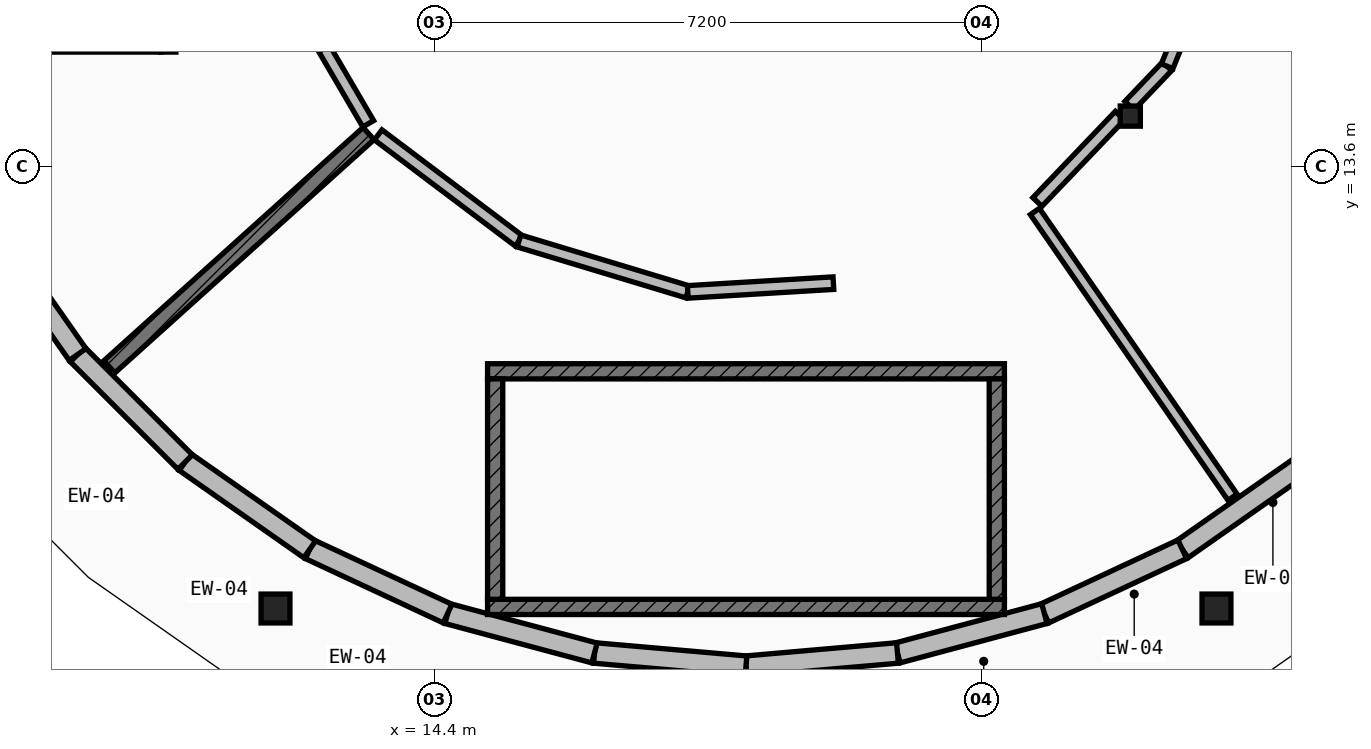
"""IFC4 building model, lengths in metres.
Left out: names, types, materials, properties, quantities, classifications, styles, units other than length and angle.
Written with IfcOpenShell. Run it as: python <this file> out.ifc"""

import sys

from ifc_helpers import new_model, si_unit, direction, frame, frame_2d, origin, origin_2d, place, context, subcontext, project, spatial, rectangle, circle, extrude, element, fill, save


model = new_model("IFC4")
c1 = context("Model", 3, precision=1e-05, world=origin(), true_north=direction((0.0, 1.0)))
c2 = subcontext(c1, "Body", "Model", "MODEL_VIEW")
j1 = project(units=[si_unit("LENGTHUNIT", "METRE"), si_unit("PLANEANGLEUNIT", "RADIAN")], contexts=[c1])
p1 = place(None, origin())
s1 = spatial("IfcSite", under=j1, at=p1, CompositionType="ELEMENT")
p2 = place(p1, origin())
s2 = spatial("IfcBuilding", under=s1, at=p2, CompositionType="ELEMENT")
p3 = place(p2, frame((0.0, 0.0, 17.15)))
s3 = spatial("IfcBuildingStorey", under=s2, at=p3, CompositionType="ELEMENT", Elevation=17.15)
for number, where, z_axis, x_axis in (
    (1, (12.31, 7.779, 0.0), (0.0, 0.0, 1.0), (1.0, 0.0, 0.0)),
    (2, (24.69, 7.779, 0.0), (0.0, 0.0, 1.0), (1.0, 0.0, 0.0)),
):
    element("IfcColumn", number, at=place(p3, frame(where, z_axis=z_axis, x_axis=x_axis)), inside=s3, PredefinedType="PILASTER", context=c2, shape_type="SweptSolid", body=[
        extrude(circle(Radius=0.19, at=origin_2d()), origin(), (0.0, 0.0, 1.0), 4.2),
    ])
p4 = place(p3, frame((23.556, 14.258, 0.0), z_axis=(0.0, 0.0, 1.0), x_axis=(1.0, 0.0, 0.0)))
e3 = element("IfcColumn", 3, at=p4, inside=s3, PredefinedType="COLUMN", context=c2, shape_type="SweptSolid", body=[
    extrude(rectangle(XDim=0.265, YDim=0.265, at=origin_2d()), origin(), (0.0, 0.0, 1.0), 4.2),
])
p5 = place(p3, frame((25.879, 9.706, 0.0), z_axis=(0.0, 0.0, 1.0), x_axis=(-0.819065655169, -0.573699793029, 0.0)))
e4 = element("IfcWall", 4, at=p5, inside=s3, PredefinedType="ELEMENTEDWALL", context=c2, shape_type="SweptSolid", body=[
    extrude(rectangle(XDim=2.001, YDim=0.27, at=frame_2d((1.0, 0.0))), origin(), (0.0, 0.0, 1.0), 3.314),
])
p6 = place(p5, frame((0.411, 0.0, 0.85)))
e5 = element("IfcOpeningElement", 5, at=p6, cuts=e4, PredefinedType="OPENING", context=c2, shape_type="SweptSolid", body=[
    extrude(rectangle(XDim=1.18, YDim=1.55, at=frame_2d((0.59, 0.775))), frame((0.0, 0.145, 0.0), z_axis=(0.0, -1.0, 0.0), x_axis=(1.0, 0.0, 0.0)), (0.0, 0.0, 1.0), 0.29),
])
p7 = place(p3, frame((24.24, 8.558, 0.0), z_axis=(0.0, 0.0, 1.0), x_axis=(-0.906245451167, -0.422751915713, 0.0)))
e6 = element("IfcWall", 6, at=p7, inside=s3, PredefinedType="ELEMENTEDWALL", context=c2, shape_type="SweptSolid", body=[
    extrude(rectangle(XDim=2.002, YDim=0.27, at=frame_2d((1.001, 0.0))), origin(), (0.0, 0.0, 1.0), 3.314),
])
p8 = place(p7, frame((0.411, 0.0, 0.85)))
e7 = element("IfcOpeningElement", 7, at=p8, cuts=e6, PredefinedType="OPENING", context=c2, shape_type="SweptSolid", body=[
    extrude(rectangle(XDim=1.18, YDim=1.85, at=frame_2d((0.59, 0.925))), frame((0.0, 0.145, 0.0), z_axis=(0.0, -1.0, 0.0), x_axis=(1.0, 0.0, 0.0)), (0.0, 0.0, 1.0), 0.29),
])
p9 = place(p3, frame((22.426, 7.712, 0.0), z_axis=(0.0, 0.0, 1.0), x_axis=(-0.965944784715, -0.258748280927, 0.0)))
e8 = element("IfcWall", 8, at=p9, inside=s3, PredefinedType="ELEMENTEDWALL", context=c2, shape_type="SweptSolid", body=[
    extrude(rectangle(XDim=2.001, YDim=0.27, at=frame_2d((1.0, 0.0))), origin(), (0.0, 0.0, 1.0), 3.314),
])
p10 = place(p9, frame((0.401, 0.0, 0.85)))
e9 = element("IfcOpeningElement", 9, at=p10, cuts=e8, PredefinedType="OPENING", context=c2, shape_type="SweptSolid", body=[
    extrude(rectangle(XDim=1.2, YDim=1.35, at=frame_2d((0.6, 0.675))), frame((0.0, 0.145, 0.0), z_axis=(0.0, -1.0, 0.0), x_axis=(1.0, 0.0, 0.0)), (0.0, 0.0, 1.0), 0.29),
])
for number, where, z_axis, x_axis in (
    (10, (20.493, 7.194, 0.0), (0.0, 0.0, 1.0), (-0.996, -0.087, 0.0)),
    (11, (18.5, 7.02, 0.0), (0.0, 0.0, 1.0), (-0.996, 0.087, 0.0)),
):
    element("IfcWall", number, at=place(p3, frame(where, z_axis=z_axis, x_axis=x_axis)), inside=s3, PredefinedType="ELEMENTEDWALL", context=c2, shape_type="SweptSolid", body=[
        extrude(rectangle(XDim=2.0, YDim=0.27, at=frame_2d((1.0, 0.0))), origin(), (0.0, 0.0, 1.0), 3.314),
    ])
p11 = place(p3, frame((16.507, 7.194, 0.0), z_axis=(0.0, 0.0, 1.0), x_axis=(-0.965944784715, 0.258748280927, 0.0)))
e12 = element("IfcWall", 12, at=p11, inside=s3, PredefinedType="ELEMENTEDWALL", context=c2, shape_type="SweptSolid", body=[
    extrude(rectangle(XDim=2.001, YDim=0.27, at=frame_2d((1.0, 0.0))), origin(), (0.0, 0.0, 1.0), 3.314),
])
p12 = place(p11, frame((0.401, 0.0, 0.85)))
e13 = element("IfcOpeningElement", 13, at=p12, cuts=e12, PredefinedType="OPENING", context=c2, shape_type="SweptSolid", body=[
    extrude(rectangle(XDim=1.2, YDim=1.65, at=frame_2d((0.6, 0.825))), frame((0.0, 0.145, 0.0), z_axis=(0.0, -1.0, 0.0), x_axis=(1.0, 0.0, 0.0)), (0.0, 0.0, 1.0), 0.29),
])
p13 = place(p3, frame((14.574, 7.712, 0.0), z_axis=(0.0, 0.0, 1.0), x_axis=(-0.906245451167, 0.422751915713, 0.0)))
e14 = element("IfcWall", 14, at=p13, inside=s3, PredefinedType="ELEMENTEDWALL", context=c2, shape_type="SweptSolid", body=[
    extrude(rectangle(XDim=2.002, YDim=0.27, at=frame_2d((1.001, 0.0))), origin(), (0.0, 0.0, 1.0), 3.314),
])
p14 = place(p13, frame((0.401, 0.0, 0.85)))
e15 = element("IfcOpeningElement", 15, at=p14, cuts=e14, PredefinedType="OPENING", context=c2, shape_type="SweptSolid", body=[
    extrude(rectangle(XDim=1.2, YDim=1.95, at=frame_2d((0.6, 0.975))), frame((0.0, 0.145, 0.0), z_axis=(0.0, -1.0, 0.0), x_axis=(1.0, 0.0, 0.0)), (0.0, 0.0, 1.0), 0.29),
])
p15 = place(p3, frame((12.76, 8.558, 0.0), z_axis=(0.0, 0.0, 1.0), x_axis=(-0.819065655169, 0.573699793029, 0.0)))
e16 = element("IfcWall", 16, at=p15, inside=s3, PredefinedType="ELEMENTEDWALL", context=c2, shape_type="SweptSolid", body=[
    extrude(rectangle(XDim=2.001, YDim=0.27, at=frame_2d((1.0, 0.0))), origin(), (0.0, 0.0, 1.0), 3.314),
])
p16 = place(p15, frame((0.401, 0.0, 0.85)))
e17 = element("IfcOpeningElement", 17, at=p16, cuts=e16, PredefinedType="OPENING", context=c2, shape_type="SweptSolid", body=[
    extrude(rectangle(XDim=1.2, YDim=2.25, at=frame_2d((0.6, 1.125))), frame((0.0, 0.145, 0.0), z_axis=(0.0, -1.0, 0.0), x_axis=(1.0, 0.0, 0.0)), (0.0, 0.0, 1.0), 0.29),
])
p17 = place(p3, frame((11.121, 9.706, 0.0), z_axis=(0.0, 0.0, 1.0), x_axis=(-0.707106781187, 0.707106781187, 0.0)))
e18 = element("IfcWall", 18, at=p17, inside=s3, PredefinedType="ELEMENTEDWALL", context=c2, shape_type="SweptSolid", body=[
    extrude(rectangle(XDim=2.001, YDim=0.27, at=frame_2d((1.0, 0.0))), origin(), (0.0, 0.0, 1.0), 3.314),
])
p18 = place(p17, frame((0.391, 0.0, 0.85)))
e19 = element("IfcOpeningElement", 19, at=p18, cuts=e18, PredefinedType="OPENING", context=c2, shape_type="SweptSolid", body=[
    extrude(rectangle(XDim=1.22, YDim=1.5, at=frame_2d((0.61, 0.75))), frame((0.0, 0.145, 0.0), z_axis=(0.0, -1.0, 0.0), x_axis=(1.0, 0.0, 0.0)), (0.0, 0.0, 1.0), 0.29),
])
p19 = place(p3, frame((9.706, 11.121, 0.0), z_axis=(0.0, 0.0, 1.0), x_axis=(-0.573699793029, 0.819065655169, 0.0)))
e20 = element("IfcWall", 20, at=p19, inside=s3, PredefinedType="ELEMENTEDWALL", context=c2, shape_type="SweptSolid", body=[
    extrude(rectangle(XDim=2.001, YDim=0.27, at=frame_2d((1.0, 0.0))), origin(), (0.0, 0.0, 1.0), 3.314),
])
p20 = place(p19, frame((0.391, 0.0, 0.85)))
e21 = element("IfcOpeningElement", 21, at=p20, cuts=e20, PredefinedType="OPENING", context=c2, shape_type="SweptSolid", body=[
    extrude(rectangle(XDim=1.22, YDim=1.8, at=frame_2d((0.61, 0.9))), frame((0.0, 0.145, 0.0), z_axis=(0.0, -1.0, 0.0), x_axis=(1.0, 0.0, 0.0)), (0.0, 0.0, 1.0), 0.29),
])
p21 = place(p3, frame((21.9, 10.9, 0.0), z_axis=(0.0, 0.0, 1.0), x_axis=(-1.0, 0.0, 0.0)))
e22 = element("IfcWall", 22, at=p21, inside=s3, PredefinedType="SHEAR", context=c2, shape_type="SweptSolid", body=[
    extrude(rectangle(XDim=6.8, YDim=0.2, at=frame_2d((3.4, 0.0))), origin(), (0.0, 0.0, 1.0), 3.96),
])
p22 = place(p21, frame((0.38, 0.0, 0.0)))
e23 = element("IfcOpeningElement", 23, at=p22, cuts=e22, PredefinedType="OPENING", context=c2, shape_type="SweptSolid", body=[
    extrude(rectangle(XDim=1.1, YDim=2.15, at=frame_2d((0.55, 1.075))), frame((0.0, 0.11, 0.0), z_axis=(0.0, -1.0, 0.0), x_axis=(1.0, 0.0, 0.0)), (0.0, 0.0, 1.0), 0.22),
])
p23 = place(p3, frame((21.9, 7.8, 0.0), z_axis=(0.0, 0.0, 1.0), x_axis=(-1.0, 0.0, 0.0)))
e24 = element("IfcWall", 24, at=p23, inside=s3, PredefinedType="SHEAR", context=c2, shape_type="SweptSolid", body=[
    extrude(rectangle(XDim=6.8, YDim=0.2, at=frame_2d((3.4, 0.0))), origin(), (0.0, 0.0, 1.0), 3.96),
])
for number, where, z_axis, x_axis in (
    (25, (21.8, 10.8, 0.0), (0.0, 0.0, 1.0), (0.0, -1.0, 0.0)),
    (26, (15.2, 10.8, 0.0), (0.0, 0.0, 1.0), (0.0, -1.0, 0.0)),
):
    element("IfcWall", number, at=place(p3, frame(where, z_axis=z_axis, x_axis=x_axis)), inside=s3, PredefinedType="SHEAR", context=c2, shape_type="SweptSolid", body=[
        extrude(rectangle(XDim=2.9, YDim=0.2, at=frame_2d((1.45, 0.0))), origin(), (0.0, 0.0, 1.0), 3.96),
    ])
p24 = place(p3, frame((13.534, 14.028, 0.0), z_axis=(0.0, 0.0, 1.0), x_axis=(-0.743275623073, -0.668985312354, 0.0)))
e27 = element("IfcWall", 27, at=p24, inside=s3, PredefinedType="SOLIDWALL", context=c2, shape_type="SweptSolid", body=[
    extrude(rectangle(XDim=4.588, YDim=0.215, at=frame_2d((2.294, 0.0))), origin(), (0.0, 0.0, 1.0), 3.279),
])
p25 = place(p3, frame((22.301, 13.003, 0.0), z_axis=(0.0, 0.0, 1.0), x_axis=(0.56891282969, -0.822397830867, 0.0)))
e28 = element("IfcWall", 28, at=p25, inside=s3, PredefinedType="PARTITIONING", context=c2, shape_type="SweptSolid", body=[
    extrude(rectangle(XDim=4.572, YDim=0.145, at=frame_2d((2.286, 0.0))), origin(), (0.0, 0.0, 1.0), 3.279),
])
p26 = place(p3, frame((12.95, 15.148, 0.0), z_axis=(0.0, 0.0, 1.0), x_axis=(0.505179201569, -0.863014469347, 0.0)))
e29 = element("IfcWall", 29, at=p26, inside=s3, PredefinedType="PARTITIONING", context=c2, shape_type="SweptSolid", body=[
    extrude(rectangle(XDim=1.148, YDim=0.165, at=frame_2d((0.574, 0.0))), origin(), (0.0, 0.0, 1.0), 3.279),
])
p27 = place(p3, frame((13.661, 14.011, 0.0), z_axis=(0.0, 0.0, 1.0), x_axis=(0.798557639329, -0.601918347177, 0.0)))
e30 = element("IfcWall", 30, at=p27, inside=s3, PredefinedType="PARTITIONING", context=c2, shape_type="SweptSolid", body=[
    extrude(rectangle(XDim=2.319, YDim=0.165, at=frame_2d((1.16, 0.0))), origin(), (0.0, 0.0, 1.0), 3.279),
])
p28 = place(p27, frame((0.485, 0.0, 0.0)))
e31 = element("IfcOpeningElement", 31, at=p28, cuts=e30, PredefinedType="OPENING", context=c2, shape_type="SweptSolid", body=[
    extrude(rectangle(XDim=1.35, YDim=2.22, at=frame_2d((0.675, 1.11))), frame((0.0, 0.093, 0.0), z_axis=(0.0, -1.0, 0.0), x_axis=(1.0, 0.0, 0.0)), (0.0, 0.0, 1.0), 0.185),
])
p29 = place(p3, frame((15.513, 12.615, 0.0), z_axis=(0.0, 0.0, 1.0), x_axis=(0.957393612843, -0.288786201346, 0.0)))
e32 = element("IfcWall", 32, at=p29, inside=s3, PredefinedType="PARTITIONING", context=c2, shape_type="SweptSolid", body=[
    extrude(rectangle(XDim=2.32, YDim=0.165, at=frame_2d((1.16, 0.0))), origin(), (0.0, 0.0, 1.0), 3.279),
])
p30 = place(p3, frame((17.734, 11.945, 0.0), z_axis=(0.0, 0.0, 1.0), x_axis=(0.998203932851, 0.059907499028, 0.0)))
e33 = element("IfcWall", 33, at=p30, inside=s3, PredefinedType="PARTITIONING", context=c2, shape_type="SweptSolid", body=[
    extrude(rectangle(XDim=1.919, YDim=0.165, at=frame_2d((0.96, 0.0))), origin(), (0.0, 0.0, 1.0), 3.279),
])
p31 = place(p3, frame((22.334, 13.128, 0.0), z_axis=(0.0, 0.0, 1.0), x_axis=(0.69098960796, 0.722864691136, 0.0)))
e34 = element("IfcWall", 34, at=p31, inside=s3, PredefinedType="PARTITIONING", context=c2, shape_type="SweptSolid", body=[
    extrude(rectangle(XDim=1.57, YDim=0.165, at=frame_2d((0.785, 0.0))), origin(), (0.0, 0.0, 1.0), 3.279),
])
p32 = place(p31, frame((0.24, 0.0, 0.0)))
e35 = element("IfcOpeningElement", 35, at=p32, cuts=e34, PredefinedType="OPENING", context=c2, shape_type="SweptSolid", body=[
    extrude(rectangle(XDim=1.09, YDim=2.22, at=frame_2d((0.545, 1.11))), frame((0.0, 0.093, 0.0), z_axis=(0.0, -1.0, 0.0), x_axis=(1.0, 0.0, 0.0)), (0.0, 0.0, 1.0), 0.185),
])
p33 = place(p3, frame((23.545, 14.395, 0.0), z_axis=(0.0, 0.0, 1.0), x_axis=(0.690944661627, 0.722907652864, 0.0)))
e36 = element("IfcWall", 36, at=p33, inside=s3, PredefinedType="PARTITIONING", context=c2, shape_type="SweptSolid", body=[
    extrude(rectangle(XDim=0.718, YDim=0.165, at=frame_2d((0.359, 0.0))), origin(), (0.0, 0.0, 1.0), 3.279),
])
p34 = place(p3, frame((24.041, 14.914, 0.0), z_axis=(0.0, 0.0, 1.0), x_axis=(0.376411505865, 0.926452577444, 0.0)))
e37 = element("IfcWall", 37, at=p34, inside=s3, PredefinedType="PARTITIONING", context=c2, shape_type="SweptSolid", body=[
    extrude(rectangle(XDim=2.47, YDim=0.165, at=frame_2d((1.235, 0.0))), origin(), (0.0, 0.0, 1.0), 3.279),
])
p35 = place(p6, origin())
e38 = element("IfcWindow", 38, at=p35, inside=s3, PartitioningType="SINGLE_PANEL", PredefinedType="WINDOW", context=c2, shape_type="SweptSolid", body=[
    extrude(rectangle(XDim=1.18, YDim=1.55, at=frame_2d((0.59, 0.775))), frame((0.0, 0.03, 0.0), z_axis=(0.0, -1.0, 0.0), x_axis=(1.0, 0.0, 0.0)), (0.0, 0.0, 1.0), 0.06),
])
fill(e5, e38)
p36 = place(p8, origin())
e39 = element("IfcWindow", 39, at=p36, inside=s3, PartitioningType="SINGLE_PANEL", PredefinedType="WINDOW", context=c2, shape_type="SweptSolid", body=[
    extrude(rectangle(XDim=1.18, YDim=1.85, at=frame_2d((0.59, 0.925))), frame((0.0, 0.03, 0.0), z_axis=(0.0, -1.0, 0.0), x_axis=(1.0, 0.0, 0.0)), (0.0, 0.0, 1.0), 0.06),
])
fill(e7, e39)
p37 = place(p10, origin())
e40 = element("IfcWindow", 40, at=p37, inside=s3, PartitioningType="SINGLE_PANEL", PredefinedType="WINDOW", context=c2, shape_type="SweptSolid", body=[
    extrude(rectangle(XDim=1.2, YDim=1.35, at=frame_2d((0.6, 0.675))), frame((0.0, 0.03, 0.0), z_axis=(0.0, -1.0, 0.0), x_axis=(1.0, 0.0, 0.0)), (0.0, 0.0, 1.0), 0.06),
])
fill(e9, e40)
p38 = place(p12, origin())
e41 = element("IfcWindow", 41, at=p38, inside=s3, PartitioningType="SINGLE_PANEL", PredefinedType="WINDOW", context=c2, shape_type="SweptSolid", body=[
    extrude(rectangle(XDim=1.2, YDim=1.65, at=frame_2d((0.6, 0.825))), frame((0.0, 0.03, 0.0), z_axis=(0.0, -1.0, 0.0), x_axis=(1.0, 0.0, 0.0)), (0.0, 0.0, 1.0), 0.06),
])
fill(e13, e41)
p39 = place(p14, origin())
e42 = element("IfcWindow", 42, at=p39, inside=s3, PartitioningType="SINGLE_PANEL", PredefinedType="WINDOW", context=c2, shape_type="SweptSolid", body=[
    extrude(rectangle(XDim=1.2, YDim=1.95, at=frame_2d((0.6, 0.975))), frame((0.0, 0.03, 0.0), z_axis=(0.0, -1.0, 0.0), x_axis=(1.0, 0.0, 0.0)), (0.0, 0.0, 1.0), 0.06),
])
fill(e15, e42)
p40 = place(p16, origin())
e43 = element("IfcWindow", 43, at=p40, inside=s3, PartitioningType="SINGLE_PANEL", PredefinedType="WINDOW", context=c2, shape_type="SweptSolid", body=[
    extrude(rectangle(XDim=1.2, YDim=2.25, at=frame_2d((0.6, 1.125))), frame((0.0, 0.03, 0.0), z_axis=(0.0, -1.0, 0.0), x_axis=(1.0, 0.0, 0.0)), (0.0, 0.0, 1.0), 0.06),
])
fill(e17, e43)
p41 = place(p18, origin())
e44 = element("IfcWindow", 44, at=p41, inside=s3, PartitioningType="SINGLE_PANEL", PredefinedType="WINDOW", context=c2, shape_type="SweptSolid", body=[
    extrude(rectangle(XDim=1.22, YDim=1.5, at=frame_2d((0.61, 0.75))), frame((0.0, 0.03, 0.0), z_axis=(0.0, -1.0, 0.0), x_axis=(1.0, 0.0, 0.0)), (0.0, 0.0, 1.0), 0.06),
])
fill(e19, e44)
p42 = place(p20, origin())
e45 = element("IfcWindow", 45, at=p42, inside=s3, PartitioningType="SINGLE_PANEL", PredefinedType="WINDOW", context=c2, shape_type="SweptSolid", body=[
    extrude(rectangle(XDim=1.22, YDim=1.8, at=frame_2d((0.61, 0.9))), frame((0.0, 0.03, 0.0), z_axis=(0.0, -1.0, 0.0), x_axis=(1.0, 0.0, 0.0)), (0.0, 0.0, 1.0), 0.06),
])
fill(e21, e45)
p43 = place(p22, origin())
e46 = element("IfcDoor", 46, at=p43, inside=s3, OperationType="SINGLE_SWING_RIGHT", PredefinedType="DOOR", context=c2, shape_type="SweptSolid", body=[
    extrude(rectangle(XDim=1.1, YDim=2.15, at=frame_2d((0.55, 1.075))), frame((0.0, 0.025, 0.0), z_axis=(0.0, -1.0, 0.0), x_axis=(1.0, 0.0, 0.0)), (0.0, 0.0, 1.0), 0.05),
])
fill(e23, e46)
p44 = place(p28, origin())
e47 = element("IfcDoor", 47, at=p44, inside=s3, OperationType="SINGLE_SWING_RIGHT", PredefinedType="DOOR", context=c2, shape_type="SweptSolid", body=[
    extrude(rectangle(XDim=1.35, YDim=2.22, at=frame_2d((0.675, 1.11))), frame((0.0, 0.025, 0.0), z_axis=(0.0, -1.0, 0.0), x_axis=(1.0, 0.0, 0.0)), (0.0, 0.0, 1.0), 0.05),
])
fill(e31, e47)
p45 = place(p32, origin())
e48 = element("IfcDoor", 48, at=p45, inside=s3, OperationType="SINGLE_SWING_LEFT", PredefinedType="DOOR", context=c2, shape_type="SweptSolid", body=[
    extrude(rectangle(XDim=1.09, YDim=2.22, at=frame_2d((0.545, 1.11))), frame((0.0, 0.025, 0.0), z_axis=(0.0, -1.0, 0.0), x_axis=(1.0, 0.0, 0.0)), (0.0, 0.0, 1.0), 0.05),
])
fill(e35, e48)
save(model, sys.argv[1])
